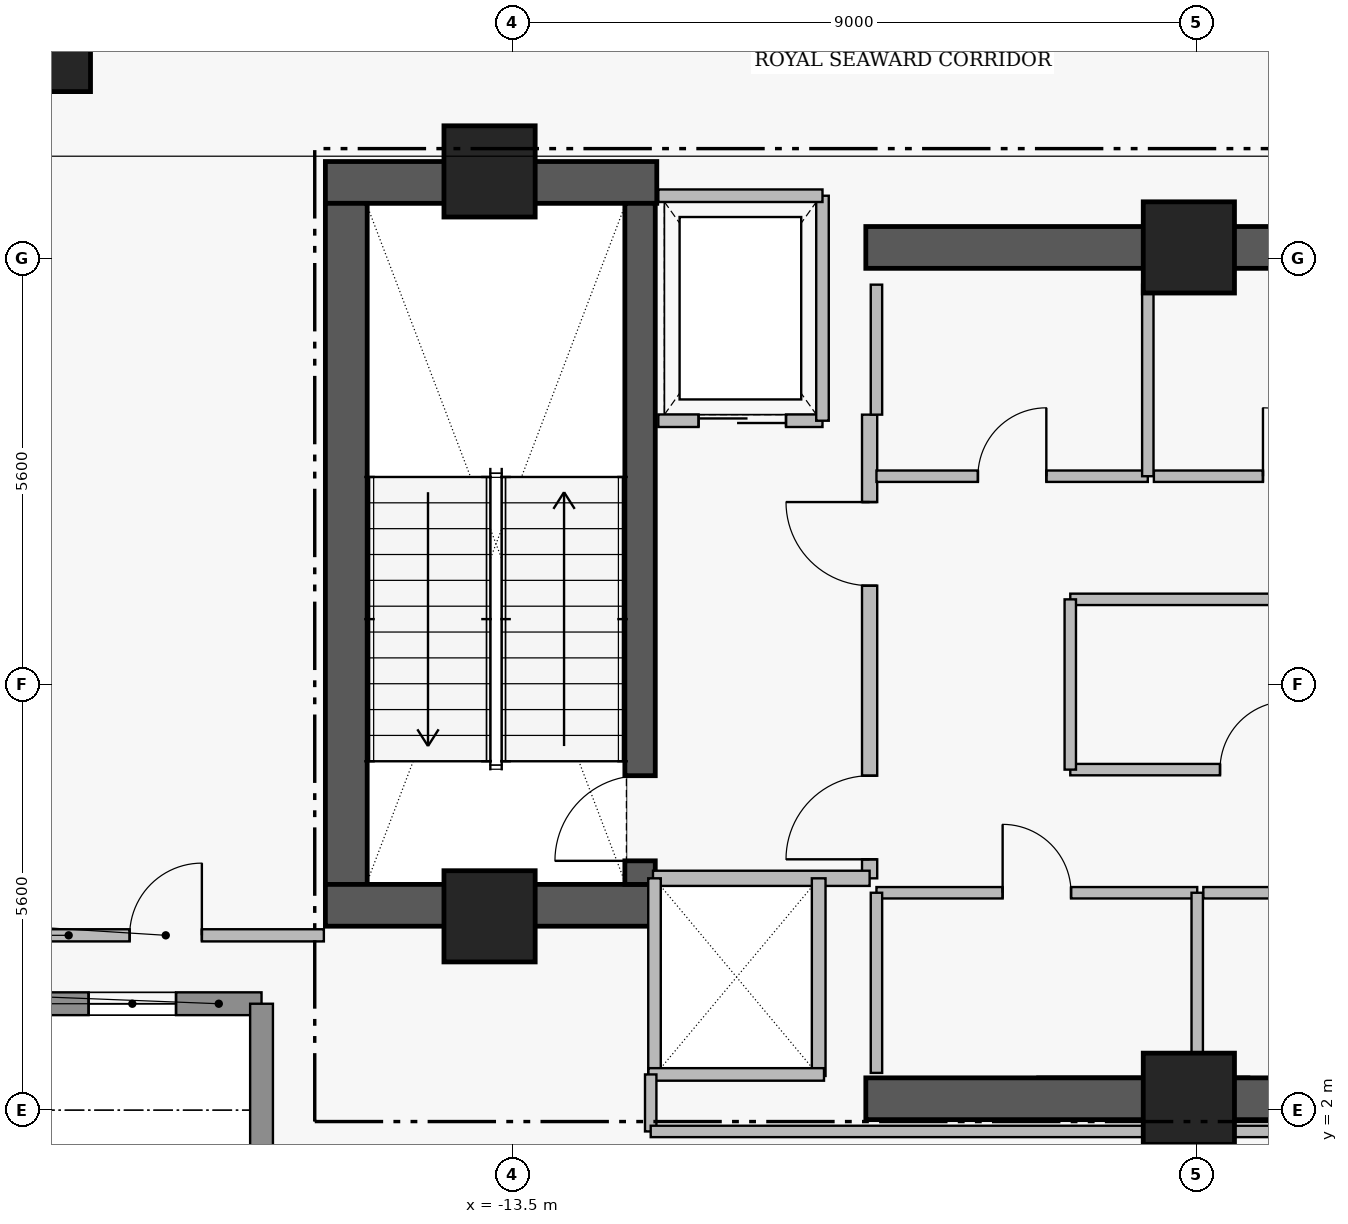
"""IFC4 building model, lengths in metres.
Left out: names, types, materials, properties, quantities, classifications, styles, units other than length and angle.
Written with IfcOpenShell. Run it as: python <this file> out.ifc"""

import sys

from ifc_helpers import new_model, si_unit, direction, frame, frame_2d, origin, origin_2d, place, context, subcontext, project, spatial, rectangle, extrude, element, fill, save


model = new_model("IFC4")
c1 = context("Model", 3, precision=1e-05, world=origin(), true_north=direction((0.0, 1.0)))
c2 = subcontext(c1, "Body", "Model", "MODEL_VIEW")
j1 = project(units=[si_unit("LENGTHUNIT", "METRE"), si_unit("PLANEANGLEUNIT", "RADIAN")], contexts=[c1])
p1 = place(None, origin())
s1 = spatial("IfcSite", under=j1, at=p1, CompositionType="ELEMENT")
p2 = place(p1, origin())
s2 = spatial("IfcBuilding", under=s1, at=p2, CompositionType="ELEMENT")
p3 = place(p2, frame((0.0, 0.0, 284.05)))
s3 = spatial("IfcBuildingStorey", under=s2, at=p3, CompositionType="ELEMENT", Elevation=284.05)
p4 = place(p3, frame((-15.96, 14.205, 0.0), z_axis=(0.0, 0.0, 1.0), x_axis=(1.0, 0.0, 0.0)))
e1 = element("IfcWall", 1, at=p4, inside=s3, PredefinedType="SHEAR", context=c2, shape_type="SweptSolid", body=[
    extrude(rectangle(XDim=4.36, YDim=0.55, at=frame_2d((2.18, 0.0))), origin(), (0.0, 0.0, 1.0), 4.21),
])
p5 = place(p3, frame((-15.685, 4.97, 0.0), z_axis=(0.0, 0.0, 1.0), x_axis=(0.0, 1.0, 0.0)))
e2 = element("IfcWall", 2, at=p5, inside=s3, PredefinedType="SHEAR", context=c2, shape_type="SweptSolid", body=[
    extrude(rectangle(XDim=8.96, YDim=0.55, at=frame_2d((4.48, 0.0))), origin(), (0.0, 0.0, 1.0), 4.21),
])
p6 = place(p3, frame((-15.96, 4.695, 0.0), z_axis=(0.0, 0.0, 1.0), x_axis=(1.0, 0.0, 0.0)))
e3 = element("IfcWall", 3, at=p6, inside=s3, PredefinedType="SHEAR", context=c2, shape_type="SweptSolid", body=[
    extrude(rectangle(XDim=4.36, YDim=0.55, at=frame_2d((2.18, 0.0))), origin(), (0.0, 0.0, 1.0), 4.21),
])
for number, where, z_axis, x_axis in (
    (4, (-8.85, 2.15, 0.0), (0.0, 0.0, 1.0), (1.0, 0.0, 0.0)),
    (5, (-8.85, 13.35, 0.0), (0.0, 0.0, 1.0), (1.0, 0.0, 0.0)),
):
    element("IfcWall", number, at=place(p3, frame(where, z_axis=z_axis, x_axis=x_axis)), inside=s3, PredefinedType="SHEAR", context=c2, shape_type="SweptSolid", body=[
        extrude(rectangle(XDim=7.6, YDim=0.55, at=frame_2d((3.8, 0.0))), origin(), (0.0, 0.0, 1.0), 4.18),
    ])
p7 = place(p3, frame((-11.82, 4.97, 0.0), z_axis=(0.0, 0.0, 1.0), x_axis=(0.0, 1.0, 0.0)))
e6 = element("IfcWall", 6, at=p7, inside=s3, PredefinedType="SHEAR", context=c2, shape_type="SweptSolid", body=[
    extrude(rectangle(XDim=8.96, YDim=0.4, at=frame_2d((4.48, 0.0))), origin(), (0.0, 0.0, 1.0), 4.21),
])
p8 = place(p7, frame((0.31, 0.0, 0.0)))
e7 = element("IfcOpeningElement", 7, at=p8, cuts=e6, PredefinedType="OPENING", context=c2, shape_type="SweptSolid", body=[
    extrude(rectangle(XDim=1.12, YDim=2.22, at=frame_2d((0.56, 1.11))), frame((0.0, 0.21, 0.0), z_axis=(0.0, -1.0, 0.0), x_axis=(1.0, 0.0, 0.0)), (0.0, 0.0, 1.0), 0.42),
])
for number, where, z_axis, x_axis in (
    (8, (-13.8, 14.35, 0.0), (0.0, 0.0, 1.0), (1.0, 0.0, 0.0)),
    (9, (-4.6, 13.35, 0.0), (0.0, 0.0, 1.0), (1.0, 0.0, 0.0)),
    (10, (-13.8, 4.55, 0.0), (0.0, 0.0, 1.0), (1.0, 0.0, 0.0)),
    (11, (-4.6, 2.15, 0.0), (0.0, 0.0, 1.0), (1.0, 0.0, 0.0)),
):
    element("IfcColumn", number, at=place(p3, frame(where, z_axis=z_axis, x_axis=x_axis)), inside=s3, PredefinedType="COLUMN", context=c2, shape_type="SweptSolid", body=[
        extrude(rectangle(XDim=1.2, YDim=1.2, at=origin_2d()), origin(), (0.0, 0.0, 1.0), 4.4),
    ])
p9 = place(p3, frame((-19.55, 15.9, 0.0), z_axis=(0.0, 0.0, 1.0), x_axis=(1.0, 0.0, 0.0)))
e12 = element("IfcColumn", 12, at=p9, inside=s3, PredefinedType="COLUMN", context=c2, shape_type="SweptSolid", body=[
    extrude(rectangle(XDim=1.0, YDim=1.0, at=origin_2d()), origin(), (0.0, 0.0, 1.0), 4.4),
])
p10 = place(p3, frame((-16.8, 3.4, 0.0), z_axis=(0.0, 0.0, 1.0), x_axis=(-1.0, 0.0, 0.0)))
e13 = element("IfcWall", 13, at=p10, inside=s3, PredefinedType="STANDARD", context=c2, shape_type="SweptSolid", body=[
    extrude(rectangle(XDim=3.4, YDim=0.3, at=frame_2d((1.7, 0.0))), origin(), (0.0, 0.0, 1.0), 4.18),
])
p11 = place(p10, frame((1.125, 0.0, 1.25)))
e14 = element("IfcOpeningElement", 14, at=p11, cuts=e13, PredefinedType="OPENING", context=c2, shape_type="SweptSolid", body=[
    extrude(rectangle(XDim=1.15, YDim=1.55, at=frame_2d((0.575, 0.775))), frame((0.0, 0.16, 0.0), z_axis=(0.0, -1.0, 0.0), x_axis=(1.0, 0.0, 0.0)), (0.0, 0.0, 1.0), 0.32),
])
p12 = place(p3, frame((-16.8, 0.0, 0.0), z_axis=(0.0, 0.0, 1.0), x_axis=(0.0, 1.0, 0.0)))
e15 = element("IfcWall", 15, at=p12, inside=s3, PredefinedType="STANDARD", context=c2, shape_type="SweptSolid", body=[
    extrude(rectangle(XDim=3.4, YDim=0.3, at=frame_2d((1.7, 0.0))), origin(), (0.0, 0.0, 1.0), 4.18),
])
p13 = place(p12, frame((0.22, 0.0, 0.0)))
e16 = element("IfcOpeningElement", 16, at=p13, cuts=e15, PredefinedType="OPENING", context=c2, shape_type="SweptSolid", body=[
    extrude(rectangle(XDim=1.05, YDim=2.2, at=frame_2d((0.525, 1.1))), frame((0.0, 0.16, 0.0), z_axis=(0.0, -1.0, 0.0), x_axis=(1.0, 0.0, 0.0)), (0.0, 0.0, 1.0), 0.32),
])
p14 = place(p3, frame((-8.8, 5.05, 0.0), z_axis=(0.0, 0.0, 1.0), x_axis=(0.0, 1.0, 0.0)))
e17 = element("IfcWall", 17, at=p14, inside=s3, PredefinedType="PARTITIONING", context=c2, shape_type="SweptSolid", body=[
    extrude(rectangle(XDim=6.1, YDim=0.2, at=frame_2d((3.05, 0.0))), origin(), (0.0, 0.0, 1.0), 4.18),
])
p15 = place(p14, frame((0.25, 0.0, 0.0)))
e18 = element("IfcOpeningElement", 18, at=p15, cuts=e17, PredefinedType="OPENING", context=c2, shape_type="SweptSolid", body=[
    extrude(rectangle(XDim=1.1, YDim=2.2, at=frame_2d((0.55, 1.1))), frame((0.0, 0.11, 0.0), z_axis=(0.0, -1.0, 0.0), x_axis=(1.0, 0.0, 0.0)), (0.0, 0.0, 1.0), 0.22),
])
p16 = place(p14, frame((3.85, 0.0, 0.0)))
e19 = element("IfcOpeningElement", 19, at=p16, cuts=e17, PredefinedType="OPENING", context=c2, shape_type="SweptSolid", body=[
    extrude(rectangle(XDim=1.1, YDim=2.2, at=frame_2d((0.55, 1.1))), frame((0.0, 0.11, 0.0), z_axis=(0.0, -1.0, 0.0), x_axis=(1.0, 0.0, 0.0)), (0.0, 0.0, 1.0), 0.22),
])
p17 = place(p3, frame((-11.58, 11.07, 0.0), z_axis=(0.0, 0.0, 1.0), x_axis=(1.0, 0.0, 0.0)))
e20 = element("IfcWall", 20, at=p17, inside=s3, PredefinedType="PARTITIONING", context=c2, shape_type="SweptSolid", body=[
    extrude(rectangle(XDim=2.16, YDim=0.165, at=frame_2d((1.08, 0.0))), origin(), (0.0, 0.0, 1.0), 4.18),
])
p18 = place(p17, frame((0.53, 0.0, 0.0)))
e21 = element("IfcOpeningElement", 21, at=p18, cuts=e20, PredefinedType="OPENING", context=c2, shape_type="SweptSolid", body=[
    extrude(rectangle(XDim=1.15, YDim=2.25, at=frame_2d((0.575, 1.125))), frame((0.0, 0.093, 0.0), z_axis=(0.0, -1.0, 0.0), x_axis=(1.0, 0.0, 0.0)), (0.0, 0.0, 1.0), 0.185),
])
p19 = place(p3, frame((-8.71, 4.86, 0.0), z_axis=(0.0, 0.0, 1.0), x_axis=(1.0, 0.0, 0.0)))
e22 = element("IfcWall", 22, at=p19, inside=s3, PredefinedType="PARTITIONING", context=c2, shape_type="SweptSolid", body=[
    extrude(rectangle(XDim=4.22, YDim=0.15, at=frame_2d((2.11, 0.0))), origin(), (0.0, 0.0, 1.0), 4.18),
])
p20 = place(p19, frame((1.66, 0.0, 0.0)))
e23 = element("IfcOpeningElement", 23, at=p20, cuts=e22, PredefinedType="OPENING", context=c2, shape_type="SweptSolid", body=[
    extrude(rectangle(XDim=0.9, YDim=2.15, at=frame_2d((0.45, 1.075))), frame((0.0, 0.085, 0.0), z_axis=(0.0, -1.0, 0.0), x_axis=(1.0, 0.0, 0.0)), (0.0, 0.0, 1.0), 0.17),
])
p21 = place(p3, frame((-4.41, 4.86, 0.0), z_axis=(0.0, 0.0, 1.0), x_axis=(1.0, 0.0, 0.0)))
e24 = element("IfcWall", 24, at=p21, inside=s3, PredefinedType="PARTITIONING", context=c2, shape_type="SweptSolid", body=[
    extrude(rectangle(XDim=4.62, YDim=0.15, at=frame_2d((2.31, 0.0))), origin(), (0.0, 0.0, 1.0), 4.18),
])
p22 = place(p21, frame((1.86, 0.0, 0.0)))
e25 = element("IfcOpeningElement", 25, at=p22, cuts=e24, PredefinedType="OPENING", context=c2, shape_type="SweptSolid", body=[
    extrude(rectangle(XDim=0.9, YDim=2.15, at=frame_2d((0.45, 1.075))), frame((0.0, 0.085, 0.0), z_axis=(0.0, -1.0, 0.0), x_axis=(1.0, 0.0, 0.0)), (0.0, 0.0, 1.0), 0.17),
])
p23 = place(p3, frame((-8.71, 10.34, 0.0), z_axis=(0.0, 0.0, 1.0), x_axis=(1.0, 0.0, 0.0)))
e26 = element("IfcWall", 26, at=p23, inside=s3, PredefinedType="PARTITIONING", context=c2, shape_type="SweptSolid", body=[
    extrude(rectangle(XDim=3.57, YDim=0.15, at=frame_2d((1.785, 0.0))), origin(), (0.0, 0.0, 1.0), 4.18),
])
p24 = place(p23, frame((1.335, 0.0, 0.0)))
e27 = element("IfcOpeningElement", 27, at=p24, cuts=e26, PredefinedType="OPENING", context=c2, shape_type="SweptSolid", body=[
    extrude(rectangle(XDim=0.9, YDim=2.15, at=frame_2d((0.45, 1.075))), frame((0.0, 0.085, 0.0), z_axis=(0.0, -1.0, 0.0), x_axis=(1.0, 0.0, 0.0)), (0.0, 0.0, 1.0), 0.17),
])
p25 = place(p3, frame((-5.06, 10.34, 0.0), z_axis=(0.0, 0.0, 1.0), x_axis=(1.0, 0.0, 0.0)))
e28 = element("IfcWall", 28, at=p25, inside=s3, PredefinedType="PARTITIONING", context=c2, shape_type="SweptSolid", body=[
    extrude(rectangle(XDim=3.77, YDim=0.15, at=frame_2d((1.885, 0.0))), origin(), (0.0, 0.0, 1.0), 4.18),
])
p26 = place(p25, frame((1.435, 0.0, 0.0)))
e29 = element("IfcOpeningElement", 29, at=p26, cuts=e28, PredefinedType="OPENING", context=c2, shape_type="SweptSolid", body=[
    extrude(rectangle(XDim=0.9, YDim=2.15, at=frame_2d((0.45, 1.075))), frame((0.0, 0.085, 0.0), z_axis=(0.0, -1.0, 0.0), x_axis=(1.0, 0.0, 0.0)), (0.0, 0.0, 1.0), 0.17),
])
p27 = place(p3, frame((-6.16, 6.48, 0.0), z_axis=(0.0, 0.0, 1.0), x_axis=(1.0, 0.0, 0.0)))
e30 = element("IfcWall", 30, at=p27, inside=s3, PredefinedType="PARTITIONING", context=c2, shape_type="SweptSolid", body=[
    extrude(rectangle(XDim=4.84, YDim=0.15, at=frame_2d((2.42, 0.0))), origin(), (0.0, 0.0, 1.0), 4.18),
])
p28 = place(p27, frame((1.97, 0.0, 0.0)))
e31 = element("IfcOpeningElement", 31, at=p28, cuts=e30, PredefinedType="OPENING", context=c2, shape_type="SweptSolid", body=[
    extrude(rectangle(XDim=0.9, YDim=2.15, at=frame_2d((0.45, 1.075))), frame((0.0, 0.085, 0.0), z_axis=(0.0, -1.0, 0.0), x_axis=(1.0, 0.0, 0.0)), (0.0, 0.0, 1.0), 0.17),
])
p29 = place(p3, frame((-20.14, 4.3, 0.0), z_axis=(0.0, 0.0, 1.0), x_axis=(1.0, 0.0, 0.0)))
e32 = element("IfcWall", 32, at=p29, inside=s3, PredefinedType="PARTITIONING", context=c2, shape_type="SweptSolid", body=[
    extrude(rectangle(XDim=4.16, YDim=0.16, at=frame_2d((2.08, 0.0))), origin(), (0.0, 0.0, 1.0), 4.18),
])
p30 = place(p29, frame((1.605, 0.0, 0.0)))
e33 = element("IfcOpeningElement", 33, at=p30, cuts=e32, PredefinedType="OPENING", context=c2, shape_type="SweptSolid", body=[
    extrude(rectangle(XDim=0.95, YDim=2.15, at=frame_2d((0.475, 1.075))), frame((0.0, 0.09, 0.0), z_axis=(0.0, -1.0, 0.0), x_axis=(1.0, 0.0, 0.0)), (0.0, 0.0, 1.0), 0.18),
])
p31 = place(p3, frame((-11.65, 5.05, 0.0), z_axis=(0.0, 0.0, 1.0), x_axis=(1.0, 0.0, 0.0)))
e34 = element("IfcWall", 34, at=p31, inside=s3, PredefinedType="PARTITIONING", context=c2, shape_type="SweptSolid", body=[
    extrude(rectangle(XDim=2.85, YDim=0.2, at=frame_2d((1.425, 0.0))), origin(), (0.0, 0.0, 1.0), 4.18),
])
p32 = place(p3, frame((-9.42, 11.07, 0.0), z_axis=(0.0, 0.0, 1.0), x_axis=(0.0, 1.0, 0.0)))
e35 = element("IfcWall", 35, at=p32, inside=s3, PredefinedType="PARTITIONING", context=c2, shape_type="SweptSolid", body=[
    extrude(rectangle(XDim=2.96, YDim=0.165, at=frame_2d((1.48, 0.0))), origin(), (0.0, 0.0, 1.0), 4.18),
])
p33 = place(p3, frame((-11.58, 14.03, 0.0), z_axis=(0.0, 0.0, 1.0), x_axis=(1.0, 0.0, 0.0)))
e36 = element("IfcWall", 36, at=p33, inside=s3, PredefinedType="PARTITIONING", context=c2, shape_type="SweptSolid", body=[
    extrude(rectangle(XDim=2.16, YDim=0.165, at=frame_2d((1.08, 0.0))), origin(), (0.0, 0.0, 1.0), 4.18),
])
for number, where, z_axis, x_axis in (
    (37, (-8.71, 2.49, 0.0), (0.0, 0.0, 1.0), (0.0, 1.0, 0.0)),
    (38, (-4.49, 2.49, 0.0), (0.0, 0.0, 1.0), (0.0, 1.0, 0.0)),
):
    element("IfcWall", number, at=place(p3, frame(where, z_axis=z_axis, x_axis=x_axis)), inside=s3, PredefinedType="PARTITIONING", context=c2, shape_type="SweptSolid", body=[
        extrude(rectangle(XDim=2.37, YDim=0.15, at=frame_2d((1.185, 0.0))), origin(), (0.0, 0.0, 1.0), 4.18),
    ])
p34 = place(p3, frame((-8.71, 11.15, 0.0), z_axis=(0.0, 0.0, 1.0), x_axis=(0.0, 1.0, 0.0)))
e39 = element("IfcWall", 39, at=p34, inside=s3, PredefinedType="PARTITIONING", context=c2, shape_type="SweptSolid", body=[
    extrude(rectangle(XDim=1.71, YDim=0.15, at=frame_2d((0.855, 0.0))), origin(), (0.0, 0.0, 1.0), 4.18),
])
p35 = place(p3, frame((-5.14, 10.34, 0.0), z_axis=(0.0, 0.0, 1.0), x_axis=(0.0, 1.0, 0.0)))
e40 = element("IfcWall", 40, at=p35, inside=s3, PredefinedType="PARTITIONING", context=c2, shape_type="SweptSolid", body=[
    extrude(rectangle(XDim=2.52, YDim=0.15, at=frame_2d((1.26, 0.0))), origin(), (0.0, 0.0, 1.0), 4.18),
])
p36 = place(p3, frame((-9.47, 2.45, 0.0), z_axis=(0.0, 0.0, 1.0), x_axis=(0.0, 1.0, 0.0)))
e41 = element("IfcWall", 41, at=p36, inside=s3, PredefinedType="PARTITIONING", context=c2, shape_type="SweptSolid", body=[
    extrude(rectangle(XDim=2.6, YDim=0.18, at=frame_2d((1.3, 0.0))), origin(), (0.0, 0.0, 1.0), 4.18),
])
p37 = place(p3, frame((-11.63, 2.47, 0.0), z_axis=(0.0, 0.0, 1.0), x_axis=(0.0, 1.0, 0.0)))
e42 = element("IfcWall", 42, at=p37, inside=s3, PredefinedType="PARTITIONING", context=c2, shape_type="SweptSolid", body=[
    extrude(rectangle(XDim=2.58, YDim=0.165, at=frame_2d((1.29, 0.0))), origin(), (0.0, 0.0, 1.0), 4.18),
])
p38 = place(p3, frame((-11.71, 2.47, 0.0), z_axis=(0.0, 0.0, 1.0), x_axis=(1.0, 0.0, 0.0)))
e43 = element("IfcWall", 43, at=p38, inside=s3, PredefinedType="PARTITIONING", context=c2, shape_type="SweptSolid", body=[
    extrude(rectangle(XDim=2.31, YDim=0.165, at=frame_2d((1.155, 0.0))), origin(), (0.0, 0.0, 1.0), 3.08),
])
p39 = place(p3, frame((-6.16, 8.72, 0.0), z_axis=(0.0, 0.0, 1.0), x_axis=(1.0, 0.0, 0.0)))
e44 = element("IfcWall", 44, at=p39, inside=s3, PredefinedType="PARTITIONING", context=c2, shape_type="SweptSolid", body=[
    extrude(rectangle(XDim=4.84, YDim=0.15, at=frame_2d((2.42, 0.0))), origin(), (0.0, 0.0, 1.0), 4.18),
])
p40 = place(p3, frame((-6.16, 6.48, 0.0), z_axis=(0.0, 0.0, 1.0), x_axis=(0.0, 1.0, 0.0)))
e45 = element("IfcWall", 45, at=p40, inside=s3, PredefinedType="PARTITIONING", context=c2, shape_type="SweptSolid", body=[
    extrude(rectangle(XDim=2.24, YDim=0.15, at=frame_2d((1.12, 0.0))), origin(), (0.0, 0.0, 1.0), 4.18),
])
p41 = place(p3, frame((-11.68, 1.72, 0.0), z_axis=(0.0, 0.0, 1.0), x_axis=(0.0, 1.0, 0.0)))
e46 = element("IfcWall", 46, at=p41, inside=s3, PredefinedType="PARTITIONING", context=c2, shape_type="SweptSolid", body=[
    extrude(rectangle(XDim=0.75, YDim=0.15, at=frame_2d((0.375, 0.0))), origin(), (0.0, 0.0, 1.0), 4.18),
])
p42 = place(p3, frame((-11.68, 1.72, 0.0), z_axis=(0.0, 0.0, 1.0), x_axis=(1.0, 0.0, 0.0)))
e47 = element("IfcWall", 47, at=p42, inside=s3, PredefinedType="PARTITIONING", context=c2, shape_type="SweptSolid", body=[
    extrude(rectangle(XDim=11.68, YDim=0.15, at=frame_2d((5.84, 0.0))), origin(), (0.0, 0.0, 1.0), 3.08),
])
p43 = place(p11, origin())
e48 = element("IfcWindow", 48, at=p43, inside=s3, PartitioningType="SINGLE_PANEL", PredefinedType="WINDOW", context=c2, shape_type="SweptSolid", body=[
    extrude(rectangle(XDim=1.15, YDim=1.55, at=frame_2d((0.575, 0.775))), frame((0.0, 0.03, 0.0), z_axis=(0.0, -1.0, 0.0), x_axis=(1.0, 0.0, 0.0)), (0.0, 0.0, 1.0), 0.06),
])
fill(e14, e48)
p44 = place(p8, origin())
e49 = element("IfcDoor", 49, at=p44, inside=s3, OperationType="SINGLE_SWING_LEFT", PredefinedType="DOOR", context=c2, shape_type="SweptSolid", body=[
    extrude(rectangle(XDim=1.12, YDim=2.22, at=frame_2d((0.56, 1.11))), frame((0.0, 0.025, 0.0), z_axis=(0.0, -1.0, 0.0), x_axis=(1.0, 0.0, 0.0)), (0.0, 0.0, 1.0), 0.05),
])
fill(e7, e49)
p45 = place(p15, origin())
e50 = element("IfcDoor", 50, at=p45, inside=s3, OperationType="SINGLE_SWING_LEFT", PredefinedType="DOOR", context=c2, shape_type="SweptSolid", body=[
    extrude(rectangle(XDim=1.1, YDim=2.2, at=frame_2d((0.55, 1.1))), frame((0.0, 0.025, 0.0), z_axis=(0.0, -1.0, 0.0), x_axis=(1.0, 0.0, 0.0)), (0.0, 0.0, 1.0), 0.05),
])
fill(e18, e50)
p46 = place(p16, origin())
e51 = element("IfcDoor", 51, at=p46, inside=s3, OperationType="SINGLE_SWING_RIGHT", PredefinedType="DOOR", context=c2, shape_type="SweptSolid", body=[
    extrude(rectangle(XDim=1.1, YDim=2.2, at=frame_2d((0.55, 1.1))), frame((0.0, 0.025, 0.0), z_axis=(0.0, -1.0, 0.0), x_axis=(1.0, 0.0, 0.0)), (0.0, 0.0, 1.0), 0.05),
])
fill(e19, e51)
p47 = place(p18, origin())
e52 = element("IfcDoor", 52, at=p47, inside=s3, OperationType="SLIDING_TO_LEFT", PredefinedType="DOOR", context=c2, shape_type="SweptSolid", body=[
    extrude(rectangle(XDim=1.15, YDim=2.25, at=frame_2d((0.575, 1.125))), frame((0.0, 0.025, 0.0), z_axis=(0.0, -1.0, 0.0), x_axis=(1.0, 0.0, 0.0)), (0.0, 0.0, 1.0), 0.05),
])
fill(e21, e52)
p48 = place(p20, origin())
e53 = element("IfcDoor", 53, at=p48, inside=s3, OperationType="SINGLE_SWING_LEFT", PredefinedType="DOOR", context=c2, shape_type="SweptSolid", body=[
    extrude(rectangle(XDim=0.9, YDim=2.15, at=frame_2d((0.45, 1.075))), frame((0.0, 0.025, 0.0), z_axis=(0.0, -1.0, 0.0), x_axis=(1.0, 0.0, 0.0)), (0.0, 0.0, 1.0), 0.05),
])
fill(e23, e53)
p49 = place(p24, origin())
e54 = element("IfcDoor", 54, at=p49, inside=s3, OperationType="SINGLE_SWING_RIGHT", PredefinedType="DOOR", context=c2, shape_type="SweptSolid", body=[
    extrude(rectangle(XDim=0.9, YDim=2.15, at=frame_2d((0.45, 1.075))), frame((0.0, 0.025, 0.0), z_axis=(0.0, -1.0, 0.0), x_axis=(1.0, 0.0, 0.0)), (0.0, 0.0, 1.0), 0.05),
])
fill(e27, e54)
p50 = place(p26, origin())
e55 = element("IfcDoor", 55, at=p50, inside=s3, OperationType="SINGLE_SWING_LEFT", PredefinedType="DOOR", context=c2, shape_type="SweptSolid", body=[
    extrude(rectangle(XDim=0.9, YDim=2.15, at=frame_2d((0.45, 1.075))), frame((0.0, 0.025, 0.0), z_axis=(0.0, -1.0, 0.0), x_axis=(1.0, 0.0, 0.0)), (0.0, 0.0, 1.0), 0.05),
])
fill(e29, e55)
p51 = place(p28, origin())
e56 = element("IfcDoor", 56, at=p51, inside=s3, OperationType="SINGLE_SWING_RIGHT", PredefinedType="DOOR", context=c2, shape_type="SweptSolid", body=[
    extrude(rectangle(XDim=0.9, YDim=2.15, at=frame_2d((0.45, 1.075))), frame((0.0, 0.025, 0.0), z_axis=(0.0, -1.0, 0.0), x_axis=(1.0, 0.0, 0.0)), (0.0, 0.0, 1.0), 0.05),
])
fill(e31, e56)
p52 = place(p30, origin())
e57 = element("IfcDoor", 57, at=p52, inside=s3, OperationType="SINGLE_SWING_RIGHT", PredefinedType="DOOR", context=c2, shape_type="SweptSolid", body=[
    extrude(rectangle(XDim=0.95, YDim=2.15, at=frame_2d((0.475, 1.075))), frame((0.0, 0.025, 0.0), z_axis=(0.0, -1.0, 0.0), x_axis=(1.0, 0.0, 0.0)), (0.0, 0.0, 1.0), 0.05),
])
fill(e33, e57)
save(model, sys.argv[1])
